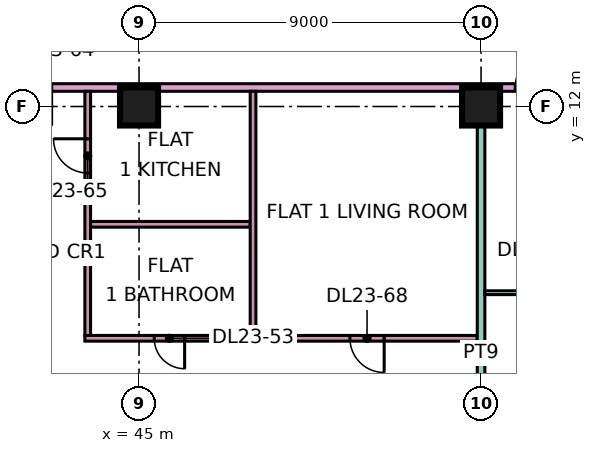
"""IFC4 building model, lengths in metres.
Left out: names, types, materials, properties, quantities, classifications, styles, units other than length and angle.
Written with IfcOpenShell. Run it as: python <this file> out.ifc"""

import sys

from ifc_helpers import new_model, si_unit, direction, frame, frame_2d, origin, origin_2d, place, context, subcontext, project, spatial, rectangle, extrude, element, fill, save


model = new_model("IFC4")
c1 = context("Model", 3, precision=1e-05, world=origin(), true_north=direction((0.0, 1.0)))
c2 = subcontext(c1, "Body", "Model", "MODEL_VIEW")
j1 = project(units=[si_unit("LENGTHUNIT", "METRE"), si_unit("PLANEANGLEUNIT", "RADIAN")], contexts=[c1])
p1 = place(None, origin())
s1 = spatial("IfcSite", under=j1, at=p1, CompositionType="ELEMENT")
p2 = place(p1, origin())
s2 = spatial("IfcBuilding", under=s1, at=p2, CompositionType="ELEMENT")
p3 = place(p2, frame((0.0, 0.0, 103.15)))
s3 = spatial("IfcBuildingStorey", under=s2, at=p3, CompositionType="ELEMENT", Elevation=103.15)
for number, where, z_axis, x_axis in (
    (1, (45.0, 12.0, 0.0), (0.0, 0.0, 1.0), (1.0, 0.0, 0.0)),
    (2, (54.0, 12.0, 0.0), (0.0, 0.0, 1.0), (1.0, 0.0, 0.0)),
):
    element("IfcColumn", number, at=place(p3, frame(where, z_axis=z_axis, x_axis=x_axis)), inside=s3, PredefinedType="COLUMN", context=c2, shape_type="SweptSolid", body=[
        extrude(rectangle(XDim=1.0, YDim=1.0, at=origin_2d()), origin(), (0.0, 0.0, 1.0), 3.75),
    ])
p4 = place(p3, frame((40.65, 12.5, 0.0), z_axis=(0.0, 0.0, 1.0), x_axis=(1.0, 0.0, 0.0)))
e3 = element("IfcWall", 3, at=p4, inside=s3, PredefinedType="PARTITIONING", context=c2, shape_type="SweptSolid", body=[
    extrude(rectangle(XDim=31.276, YDim=0.2, at=frame_2d((15.638, 0.0))), origin(), (0.0, 0.0, 1.0), 3.35),
])
p5 = place(p4, frame((14.25, 0.0, 0.0)))
e4 = element("IfcOpeningElement", 4, at=p5, cuts=e3, PredefinedType="OPENING", context=c2, shape_type="SweptSolid", body=[
    extrude(rectangle(XDim=1.0, YDim=2.1, at=frame_2d((0.5, 1.05))), frame((0.0, 0.11, 0.0), z_axis=(0.0, -1.0, 0.0), x_axis=(1.0, 0.0, 0.0)), (0.0, 0.0, 1.0), 0.22),
])
p6 = place(p4, frame((1.05, 0.0, 0.0)))
e5 = element("IfcOpeningElement", 5, at=p6, cuts=e3, PredefinedType="OPENING", context=c2, shape_type="SweptSolid", body=[
    extrude(rectangle(XDim=1.0, YDim=2.1, at=frame_2d((0.5, 1.05))), frame((0.0, 0.11, 0.0), z_axis=(0.0, -1.0, 0.0), x_axis=(1.0, 0.0, 0.0)), (0.0, 0.0, 1.0), 0.22),
])
p7 = place(p3, frame((43.575, 5.9, 0.0), z_axis=(0.0, 0.0, 1.0), x_axis=(1.0, 0.0, 0.0)))
e6 = element("IfcWall", 6, at=p7, inside=s3, PredefinedType="PARTITIONING", context=c2, shape_type="SweptSolid", body=[
    extrude(rectangle(XDim=10.325, YDim=0.15, at=frame_2d((5.163, 0.0))), origin(), (0.0, 0.0, 1.0), 3.35),
])
p8 = place(p7, frame((1.825, 0.0, 0.0)))
e7 = element("IfcOpeningElement", 7, at=p8, cuts=e6, PredefinedType="OPENING", context=c2, shape_type="SweptSolid", body=[
    extrude(rectangle(XDim=0.8, YDim=2.1, at=frame_2d((0.4, 1.05))), frame((0.0, 0.085, 0.0), z_axis=(0.0, -1.0, 0.0), x_axis=(1.0, 0.0, 0.0)), (0.0, 0.0, 1.0), 0.17),
])
p9 = place(p7, frame((6.975, 0.0, 0.0)))
e8 = element("IfcOpeningElement", 8, at=p9, cuts=e6, PredefinedType="OPENING", context=c2, shape_type="SweptSolid", body=[
    extrude(rectangle(XDim=0.9, YDim=2.1, at=frame_2d((0.45, 1.05))), frame((0.0, 0.085, 0.0), z_axis=(0.0, -1.0, 0.0), x_axis=(1.0, 0.0, 0.0)), (0.0, 0.0, 1.0), 0.17),
])
p10 = place(p3, frame((43.65, 5.975, 0.0), z_axis=(0.0, 0.0, 1.0), x_axis=(0.0, 1.0, 0.0)))
e9 = element("IfcWall", 9, at=p10, inside=s3, PredefinedType="PARTITIONING", context=c2, shape_type="SweptSolid", body=[
    extrude(rectangle(XDim=6.425, YDim=0.15, at=frame_2d((3.212, 0.0))), origin(), (0.0, 0.0, 1.0), 3.35),
])
p11 = place(p10, frame((4.275, 0.0, 0.0)))
e10 = element("IfcOpeningElement", 10, at=p11, cuts=e9, PredefinedType="OPENING", context=c2, shape_type="SweptSolid", body=[
    extrude(rectangle(XDim=0.9, YDim=2.1, at=frame_2d((0.45, 1.05))), frame((0.0, 0.085, 0.0), z_axis=(0.0, -1.0, 0.0), x_axis=(1.0, 0.0, 0.0)), (0.0, 0.0, 1.0), 0.17),
])
p12 = place(p3, frame((43.725, 8.9, 0.0), z_axis=(0.0, 0.0, 1.0), x_axis=(1.0, 0.0, 0.0)))
e11 = element("IfcWall", 11, at=p12, inside=s3, PredefinedType="PARTITIONING", context=c2, shape_type="SweptSolid", body=[
    extrude(rectangle(XDim=4.2, YDim=0.15, at=frame_2d((2.1, 0.0))), origin(), (0.0, 0.0, 1.0), 3.35),
])
p13 = place(p3, frame((48.0, 5.975, 0.0), z_axis=(0.0, 0.0, 1.0), x_axis=(0.0, 1.0, 0.0)))
e12 = element("IfcWall", 12, at=p13, inside=s3, PredefinedType="PARTITIONING", context=c2, shape_type="SweptSolid", body=[
    extrude(rectangle(XDim=6.425, YDim=0.15, at=frame_2d((3.212, 0.0))), origin(), (0.0, 0.0, 1.0), 3.35),
])
p14 = place(p3, frame((54.0, -1.351, 0.0), z_axis=(0.0, 0.0, 1.0), x_axis=(0.0, 1.0, 0.0)))
e13 = element("IfcWall", 13, at=p14, inside=s3, PredefinedType="PARTITIONING", context=c2, shape_type="SweptSolid", body=[
    extrude(rectangle(XDim=13.751, YDim=0.2, at=frame_2d((6.875, 0.0))), origin(), (0.0, 0.0, 1.0), 3.35),
])
p15 = place(p3, frame((54.1, 7.1, 0.0), z_axis=(0.0, 0.0, 1.0), x_axis=(1.0, 0.0, 0.0)))
e14 = element("IfcWall", 14, at=p15, inside=s3, PredefinedType="PARTITIONING", context=c2, shape_type="SweptSolid", body=[
    extrude(rectangle(XDim=5.85, YDim=0.1, at=frame_2d((2.925, 0.0))), origin(), (0.0, 0.0, 1.0), 3.35),
])
p16 = place(p15, frame((0.95, 0.0, 0.0)))
e15 = element("IfcOpeningElement", 15, at=p16, cuts=e14, PredefinedType="OPENING", context=c2, shape_type="SweptSolid", body=[
    extrude(rectangle(XDim=0.9, YDim=2.1, at=frame_2d((0.45, 1.05))), frame((0.0, 0.06, 0.0), z_axis=(0.0, -1.0, 0.0), x_axis=(1.0, 0.0, 0.0)), (0.0, 0.0, 1.0), 0.12),
])
p17 = place(p15, frame((3.95, 0.0, 0.0)))
e16 = element("IfcOpeningElement", 16, at=p17, cuts=e14, PredefinedType="OPENING", context=c2, shape_type="SweptSolid", body=[
    extrude(rectangle(XDim=0.9, YDim=2.1, at=frame_2d((0.45, 1.05))), frame((0.0, 0.06, 0.0), z_axis=(0.0, -1.0, 0.0), x_axis=(1.0, 0.0, 0.0)), (0.0, 0.0, 1.0), 0.12),
])
p18 = place(p5, frame((1.0, 0.0, 0.0), z_axis=(0.0, 0.0, 1.0), x_axis=(-1.0, 0.0, 0.0)))
e17 = element("IfcDoor", 17, at=p18, inside=s3, OperationType="SINGLE_SWING_RIGHT", PredefinedType="DOOR", context=c2, shape_type="SweptSolid", body=[
    extrude(rectangle(XDim=1.0, YDim=2.1, at=frame_2d((0.5, 1.05))), frame((0.0, 0.025, 0.0), z_axis=(0.0, -1.0, 0.0), x_axis=(1.0, 0.0, 0.0)), (0.0, 0.0, 1.0), 0.05),
])
fill(e4, e17)
p19 = place(p8, origin())
e18 = element("IfcDoor", 18, at=p19, inside=s3, OperationType="SINGLE_SWING_RIGHT", PredefinedType="DOOR", context=c2, shape_type="SweptSolid", body=[
    extrude(rectangle(XDim=0.8, YDim=2.1, at=frame_2d((0.4, 1.05))), frame((0.0, 0.025, 0.0), z_axis=(0.0, -1.0, 0.0), x_axis=(1.0, 0.0, 0.0)), (0.0, 0.0, 1.0), 0.05),
])
fill(e7, e18)
p20 = place(p11, frame((0.9, 0.0, 0.0), z_axis=(0.0, 0.0, 1.0), x_axis=(-1.0, 0.0, 0.0)))
e19 = element("IfcDoor", 19, at=p20, inside=s3, OperationType="SINGLE_SWING_RIGHT", PredefinedType="DOOR", context=c2, shape_type="SweptSolid", body=[
    extrude(rectangle(XDim=0.9, YDim=2.1, at=frame_2d((0.45, 1.05))), frame((0.0, 0.025, 0.0), z_axis=(0.0, -1.0, 0.0), x_axis=(1.0, 0.0, 0.0)), (0.0, 0.0, 1.0), 0.05),
])
fill(e10, e19)
p21 = place(p9, origin())
e20 = element("IfcDoor", 20, at=p21, inside=s3, OperationType="SINGLE_SWING_RIGHT", PredefinedType="DOOR", context=c2, shape_type="SweptSolid", body=[
    extrude(rectangle(XDim=0.9, YDim=2.1, at=frame_2d((0.45, 1.05))), frame((0.0, 0.025, 0.0), z_axis=(0.0, -1.0, 0.0), x_axis=(1.0, 0.0, 0.0)), (0.0, 0.0, 1.0), 0.05),
])
fill(e8, e20)
save(model, sys.argv[1])
